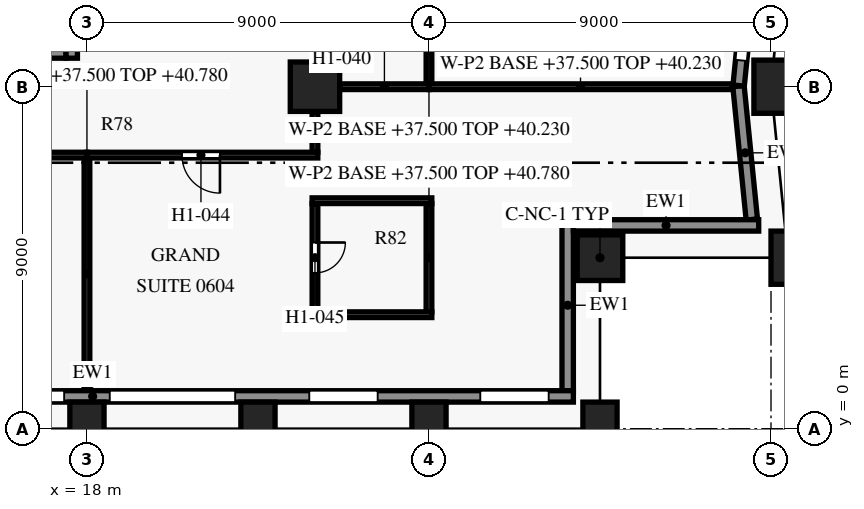
"""IFC4 building model, lengths in metres.
Left out: names, types, materials, properties, quantities, classifications, styles, units other than length and angle.
Written with IfcOpenShell. Run it as: python <this file> out.ifc"""

import sys

from ifc_helpers import new_model, si_unit, direction, frame, frame_2d, origin, origin_2d, place, context, subcontext, project, spatial, rectangle, extrude, element, fill, save


model = new_model("IFC4")
c1 = context("Model", 3, precision=1e-05, world=origin(), true_north=direction((0.0, 1.0)))
c2 = subcontext(c1, "Body", "Model", "MODEL_VIEW")
j1 = project(units=[si_unit("LENGTHUNIT", "METRE"), si_unit("PLANEANGLEUNIT", "RADIAN")], contexts=[c1])
p1 = place(None, origin())
s1 = spatial("IfcSite", under=j1, at=p1, CompositionType="ELEMENT")
p2 = place(p1, origin())
s2 = spatial("IfcBuilding", under=s1, at=p2, CompositionType="ELEMENT")
p3 = place(p2, frame((0.0, 0.0, 37.5)))
s3 = spatial("IfcBuildingStorey", under=s2, at=p3, CompositionType="ELEMENT", Elevation=37.5)
for number, where, z_axis, x_axis in (
    (1, (18.0, 0.0, 0.0), (0.0, 0.0, 1.0), (1.0, 0.0, 0.0)),
    (2, (22.5, 0.0, 0.0), (0.0, 0.0, 1.0), (1.0, 0.0, 0.0)),
    (3, (27.0, 0.0, 0.0), (0.0, 0.0, 1.0), (1.0, 0.0, 0.0)),
    (4, (31.5, 0.0, 0.0), (0.0, 0.0, 1.0), (1.0, 0.0, 0.0)),
    (5, (36.45, 4.5, 0.0), (0.0, 0.0, 1.0), (-0.1, 0.995, 0.0)),
    (6, (36.0, 9.0, 0.0), (0.0, 0.0, 1.0), (0.0, 1.0, 0.0)),
):
    element("IfcColumn", number, at=place(p3, frame(where, z_axis=z_axis, x_axis=x_axis)), inside=s3, PredefinedType="COLUMN", context=c2, shape_type="SweptSolid", body=[
        extrude(rectangle(XDim=0.9, YDim=1.4, at=origin_2d()), origin(), (0.0, 0.0, 1.0), 3.6),
    ])
p4 = place(p3, frame((31.5, 4.5, 0.0), z_axis=(0.0, 0.0, 1.0), x_axis=(1.0, 0.0, 0.0)))
e7 = element("IfcColumn", 7, at=p4, inside=s3, PredefinedType="COLUMN", context=c2, shape_type="SweptSolid", body=[
    extrude(rectangle(XDim=1.2, YDim=1.2, at=origin_2d()), origin(), (0.0, 0.0, 1.0), 3.6),
])
p5 = place(p3, frame((24.0, 9.0, 0.0), z_axis=(0.0, 0.0, 1.0), x_axis=(1.0, 0.0, 0.0)))
e8 = element("IfcColumn", 8, at=p5, inside=s3, PredefinedType="COLUMN", context=c2, shape_type="SweptSolid", body=[
    extrude(rectangle(XDim=1.3, YDim=1.3, at=origin_2d()), origin(), (0.0, 0.0, 1.0), 3.6),
])
p6 = place(p3, frame((30.8, 0.85, 0.0), z_axis=(0.0, 0.0, 1.0), x_axis=(-1.0, 0.0, 0.0)))
e9 = element("IfcWall", 9, at=p6, inside=s3, PredefinedType="SOLIDWALL", context=c2, shape_type="SweptSolid", body=[
    extrude(rectangle(XDim=25.3, YDim=0.3, at=frame_2d((12.65, 0.0))), origin(), (0.0, 0.0, 1.0), 2.95),
])
p7 = place(p6, frame((0.65, 0.0, 0.75)))
e10 = element("IfcOpeningElement", 10, at=p7, cuts=e9, PredefinedType="OPENING", context=c2, shape_type="SweptSolid", body=[
    extrude(rectangle(XDim=1.8, YDim=1.8, at=frame_2d((0.9, 0.9))), frame((0.0, 0.16, 0.0), z_axis=(0.0, -1.0, 0.0), x_axis=(1.0, 0.0, 0.0)), (0.0, 0.0, 1.0), 0.32),
])
p8 = place(p6, frame((5.15, 0.0, 0.75)))
e11 = element("IfcOpeningElement", 11, at=p8, cuts=e9, PredefinedType="OPENING", context=c2, shape_type="SweptSolid", body=[
    extrude(rectangle(XDim=1.8, YDim=1.8, at=frame_2d((0.9, 0.9))), frame((0.0, 0.16, 0.0), z_axis=(0.0, -1.0, 0.0), x_axis=(1.0, 0.0, 0.0)), (0.0, 0.0, 1.0), 0.32),
])
p9 = place(p6, frame((8.9, 0.0, 0.15)))
e12 = element("IfcOpeningElement", 12, at=p9, cuts=e9, PredefinedType="OPENING", context=c2, shape_type="SweptSolid", body=[
    extrude(rectangle(XDim=3.3, YDim=2.4, at=frame_2d((1.65, 1.2))), frame((0.0, 0.16, 0.0), z_axis=(0.0, -1.0, 0.0), x_axis=(1.0, 0.0, 0.0)), (0.0, 0.0, 1.0), 0.32),
])
p10 = place(p6, frame((13.4, 0.0, 0.15)))
e13 = element("IfcOpeningElement", 13, at=p10, cuts=e9, PredefinedType="OPENING", context=c2, shape_type="SweptSolid", body=[
    extrude(rectangle(XDim=3.3, YDim=2.4, at=frame_2d((1.65, 1.2))), frame((0.0, 0.16, 0.0), z_axis=(0.0, -1.0, 0.0), x_axis=(1.0, 0.0, 0.0)), (0.0, 0.0, 1.0), 0.32),
])
p11 = place(p6, frame((18.65, 0.0, 0.75)))
e14 = element("IfcOpeningElement", 14, at=p11, cuts=e9, PredefinedType="OPENING", context=c2, shape_type="SweptSolid", body=[
    extrude(rectangle(XDim=1.8, YDim=1.8, at=frame_2d((0.9, 0.9))), frame((0.0, 0.16, 0.0), z_axis=(0.0, -1.0, 0.0), x_axis=(1.0, 0.0, 0.0)), (0.0, 0.0, 1.0), 0.32),
])
p12 = place(p6, frame((23.15, 0.0, 0.75)))
e15 = element("IfcOpeningElement", 15, at=p12, cuts=e9, PredefinedType="OPENING", context=c2, shape_type="SweptSolid", body=[
    extrude(rectangle(XDim=1.8, YDim=1.8, at=frame_2d((0.9, 0.9))), frame((0.0, 0.16, 0.0), z_axis=(0.0, -1.0, 0.0), x_axis=(1.0, 0.0, 0.0)), (0.0, 0.0, 1.0), 0.32),
])
p13 = place(p3, frame((30.65, 5.5, 0.0), z_axis=(0.0, 0.0, 1.0), x_axis=(0.0, -1.0, 0.0)))
e16 = element("IfcWall", 16, at=p13, inside=s3, PredefinedType="SOLIDWALL", context=c2, shape_type="SweptSolid", body=[
    extrude(rectangle(XDim=4.502, YDim=0.3, at=frame_2d((2.251, 0.0))), origin(), (0.0, 0.0, 1.0), 2.95),
])
p14 = place(p3, frame((35.677, 5.35, 0.0), z_axis=(0.0, 0.0, 1.0), x_axis=(-1.0, 0.0, 0.0)))
e17 = element("IfcWall", 17, at=p14, inside=s3, PredefinedType="SOLIDWALL", context=c2, shape_type="SweptSolid", body=[
    extrude(rectangle(XDim=4.876, YDim=0.3, at=frame_2d((2.438, 0.0))), origin(), (0.0, 0.0, 1.0), 2.95),
])
p15 = place(p3, frame((35.144, 9.015, 0.0), z_axis=(0.0, 0.0, 1.0), x_axis=(0.099462600847, -0.995041301169, 0.0)))
e18 = element("IfcWall", 18, at=p15, inside=s3, PredefinedType="SOLIDWALL", context=c2, shape_type="SweptSolid", body=[
    extrude(rectangle(XDim=3.527, YDim=0.3, at=frame_2d((1.764, 0.0))), origin(), (0.0, 0.0, 1.0), 2.95),
])
p16 = place(p3, frame((36.047, 18.015, 0.0), z_axis=(0.0, 0.0, 1.0), x_axis=(-0.099522457379, -0.995035316196, 0.0)))
e19 = element("IfcWall", 19, at=p16, inside=s3, PredefinedType="SOLIDWALL", context=c2, shape_type="SweptSolid", body=[
    extrude(rectangle(XDim=9.03, YDim=0.3, at=frame_2d((4.515, 0.0))), origin(), (0.0, 0.0, 1.0), 2.95),
])
p17 = place(p16, frame((1.291, 0.0, 0.75)))
e20 = element("IfcOpeningElement", 20, at=p17, cuts=e19, PredefinedType="OPENING", context=c2, shape_type="SweptSolid", body=[
    extrude(rectangle(XDim=1.8, YDim=1.8, at=frame_2d((0.9, 0.9))), frame((0.0, 0.16, 0.0), z_axis=(0.0, -1.0, 0.0), x_axis=(1.0, 0.0, 0.0)), (0.0, 0.0, 1.0), 0.32),
])
p18 = place(p16, frame((5.064, 0.0, 0.15)))
e21 = element("IfcOpeningElement", 21, at=p18, cuts=e19, PredefinedType="OPENING", context=c2, shape_type="SweptSolid", body=[
    extrude(rectangle(XDim=3.3, YDim=2.4, at=frame_2d((1.65, 1.2))), frame((0.0, 0.16, 0.0), z_axis=(0.0, -1.0, 0.0), x_axis=(1.0, 0.0, 0.0)), (0.0, 0.0, 1.0), 0.32),
])
p19 = place(p3, frame((14.15, 9.9, 0.0), z_axis=(0.0, 0.0, 1.0), x_axis=(1.0, 0.0, 0.0)))
e22 = element("IfcWall", 22, at=p19, inside=s3, PredefinedType="SHEAR", context=c2, shape_type="SweptSolid", body=[
    extrude(rectangle(XDim=3.3, YDim=0.3, at=frame_2d((1.65, 0.0))), origin(), (0.0, 0.0, 1.0), 3.3),
])
p20 = place(p3, frame((17.6, 9.75, 0.0), z_axis=(0.0, 0.0, 1.0), x_axis=(0.0, 1.0, 0.0)))
e23 = element("IfcWall", 23, at=p20, inside=s3, PredefinedType="SHEAR", context=c2, shape_type="SweptSolid", body=[
    extrude(rectangle(XDim=8.3, YDim=0.3, at=frame_2d((4.15, 0.0))), origin(), (0.0, 0.0, 1.0), 3.3),
])
p21 = place(p20, frame((0.65, 0.0, 0.0)))
e24 = element("IfcOpeningElement", 24, at=p21, cuts=e23, PredefinedType="OPENING", context=c2, shape_type="SweptSolid", body=[
    extrude(rectangle(XDim=1.2, YDim=2.2, at=frame_2d((0.6, 1.1))), frame((0.0, 0.16, 0.0), z_axis=(0.0, -1.0, 0.0), x_axis=(1.0, 0.0, 0.0)), (0.0, 0.0, 1.0), 0.32),
])
p22 = place(p3, frame((23.925, 3.0, 0.0), z_axis=(0.0, 0.0, 1.0), x_axis=(1.0, 0.0, 0.0)))
e25 = element("IfcWall", 25, at=p22, inside=s3, PredefinedType="PARTITIONING", context=c2, shape_type="SweptSolid", body=[
    extrude(rectangle(XDim=3.15, YDim=0.15, at=frame_2d((1.575, 0.0))), origin(), (0.0, 0.0, 1.0), 2.58),
])
p23 = place(p3, frame((27.0, 3.075, 0.0), z_axis=(0.0, 0.0, 1.0), x_axis=(0.0, 1.0, 0.0)))
e26 = element("IfcWall", 26, at=p23, inside=s3, PredefinedType="PARTITIONING", context=c2, shape_type="SweptSolid", body=[
    extrude(rectangle(XDim=2.85, YDim=0.15, at=frame_2d((1.425, 0.0))), origin(), (0.0, 0.0, 1.0), 3.28),
])
p24 = place(p3, frame((24.0, 5.925, 0.0), z_axis=(0.0, 0.0, 1.0), x_axis=(0.0, -1.0, 0.0)))
e27 = element("IfcWall", 27, at=p24, inside=s3, PredefinedType="PARTITIONING", context=c2, shape_type="SweptSolid", body=[
    extrude(rectangle(XDim=2.85, YDim=0.15, at=frame_2d((1.425, 0.0))), origin(), (0.0, 0.0, 1.0), 2.58),
])
p25 = place(p24, frame((1.025, 0.0, 0.0)))
e28 = element("IfcOpeningElement", 28, at=p25, cuts=e27, PredefinedType="OPENING", context=c2, shape_type="SweptSolid", body=[
    extrude(rectangle(XDim=0.8, YDim=2.1, at=frame_2d((0.4, 1.05))), frame((0.0, 0.085, 0.0), z_axis=(0.0, -1.0, 0.0), x_axis=(1.0, 0.0, 0.0)), (0.0, 0.0, 1.0), 0.17),
])
p26 = place(p3, frame((27.075, 6.0, 0.0), z_axis=(0.0, 0.0, 1.0), x_axis=(-1.0, 0.0, 0.0)))
e29 = element("IfcWall", 29, at=p26, inside=s3, PredefinedType="PARTITIONING", context=c2, shape_type="SweptSolid", body=[
    extrude(rectangle(XDim=3.15, YDim=0.15, at=frame_2d((1.575, 0.0))), origin(), (0.0, 0.0, 1.0), 2.58),
])
p27 = place(p3, frame((18.0, 7.125, 0.0), z_axis=(0.0, 0.0, 1.0), x_axis=(0.0, -1.0, 0.0)))
e30 = element("IfcWall", 30, at=p27, inside=s3, PredefinedType="PARTITIONING", context=c2, shape_type="SweptSolid", body=[
    extrude(rectangle(XDim=6.105, YDim=0.15, at=frame_2d((3.052, 0.0))), origin(), (0.0, 0.0, 1.0), 3.28),
])
p28 = place(p3, frame((18.0, 7.2, 0.0), z_axis=(0.0, 0.0, 1.0), x_axis=(-1.0, 0.0, 0.0)))
e31 = element("IfcWall", 31, at=p28, inside=s3, PredefinedType="PARTITIONING", context=c2, shape_type="SweptSolid", body=[
    extrude(rectangle(XDim=6.075, YDim=0.15, at=frame_2d((3.038, 0.0))), origin(), (0.0, 0.0, 1.0), 2.58),
])
p29 = place(p28, frame((2.5, 0.0, 0.0)))
e32 = element("IfcOpeningElement", 32, at=p29, cuts=e31, PredefinedType="OPENING", context=c2, shape_type="SweptSolid", body=[
    extrude(rectangle(XDim=1.0, YDim=2.1, at=frame_2d((0.5, 1.05))), frame((0.0, 0.085, 0.0), z_axis=(0.0, -1.0, 0.0), x_axis=(1.0, 0.0, 0.0)), (0.0, 0.0, 1.0), 0.17),
])
p30 = place(p3, frame((24.075, 7.2, 0.0), z_axis=(0.0, 0.0, 1.0), x_axis=(-1.0, 0.0, 0.0)))
e33 = element("IfcWall", 33, at=p30, inside=s3, PredefinedType="PARTITIONING", context=c2, shape_type="SweptSolid", body=[
    extrude(rectangle(XDim=6.075, YDim=0.15, at=frame_2d((3.038, 0.0))), origin(), (0.0, 0.0, 1.0), 2.58),
])
p31 = place(p30, frame((2.575, 0.0, 0.0)))
e34 = element("IfcOpeningElement", 34, at=p31, cuts=e33, PredefinedType="OPENING", context=c2, shape_type="SweptSolid", body=[
    extrude(rectangle(XDim=1.0, YDim=2.1, at=frame_2d((0.5, 1.05))), frame((0.0, 0.085, 0.0), z_axis=(0.0, -1.0, 0.0), x_axis=(1.0, 0.0, 0.0)), (0.0, 0.0, 1.0), 0.17),
])
p32 = place(p3, frame((24.0, 8.345, 0.0), z_axis=(0.0, 0.0, 1.0), x_axis=(0.0, -1.0, 0.0)))
e35 = element("IfcWall", 35, at=p32, inside=s3, PredefinedType="PARTITIONING", context=c2, shape_type="SweptSolid", body=[
    extrude(rectangle(XDim=1.07, YDim=0.15, at=frame_2d((0.535, 0.0))), origin(), (0.0, 0.0, 1.0), 2.58),
])
p33 = place(p3, frame((27.0, 9.0, 0.0), z_axis=(0.0, 0.0, 1.0), x_axis=(-1.0, 0.0, 0.0)))
e36 = element("IfcWall", 36, at=p33, inside=s3, PredefinedType="PARTITIONING", context=c2, shape_type="SweptSolid", body=[
    extrude(rectangle(XDim=2.345, YDim=0.15, at=frame_2d((1.172, 0.0))), origin(), (0.0, 0.0, 1.0), 2.73),
])
p34 = place(p3, frame((34.975, 9.0, 0.0), z_axis=(0.0, 0.0, 1.0), x_axis=(-1.0, 0.0, 0.0)))
e37 = element("IfcWall", 37, at=p34, inside=s3, PredefinedType="PARTITIONING", context=c2, shape_type="SweptSolid", body=[
    extrude(rectangle(XDim=7.975, YDim=0.15, at=frame_2d((3.988, 0.0))), origin(), (0.0, 0.0, 1.0), 2.73),
])
p35 = place(p3, frame((27.0, 9.075, 0.0), z_axis=(0.0, 0.0, 1.0), x_axis=(0.0, 1.0, 0.0)))
e38 = element("IfcWall", 38, at=p35, inside=s3, PredefinedType="PARTITIONING", context=c2, shape_type="SweptSolid", body=[
    extrude(rectangle(XDim=1.95, YDim=0.15, at=frame_2d((0.975, 0.0))), origin(), (0.0, 0.0, 1.0), 2.73),
])
p36 = place(p3, frame((24.0, 11.025, 0.0), z_axis=(0.0, 0.0, 1.0), x_axis=(0.0, -1.0, 0.0)))
e39 = element("IfcWall", 39, at=p36, inside=s3, PredefinedType="PARTITIONING", context=c2, shape_type="SweptSolid", body=[
    extrude(rectangle(XDim=1.37, YDim=0.15, at=frame_2d((0.685, 0.0))), origin(), (0.0, 0.0, 1.0), 2.58),
])
p37 = place(p7, origin())
e40 = element("IfcWindow", 40, at=p37, inside=s3, PartitioningType="SINGLE_PANEL", PredefinedType="WINDOW", context=c2, shape_type="SweptSolid", body=[
    extrude(rectangle(XDim=1.8, YDim=1.8, at=frame_2d((0.9, 0.9))), frame((0.0, 0.03, 0.0), z_axis=(0.0, -1.0, 0.0), x_axis=(1.0, 0.0, 0.0)), (0.0, 0.0, 1.0), 0.06),
])
fill(e10, e40)
p38 = place(p8, origin())
e41 = element("IfcWindow", 41, at=p38, inside=s3, PartitioningType="SINGLE_PANEL", PredefinedType="WINDOW", context=c2, shape_type="SweptSolid", body=[
    extrude(rectangle(XDim=1.8, YDim=1.8, at=frame_2d((0.9, 0.9))), frame((0.0, 0.03, 0.0), z_axis=(0.0, -1.0, 0.0), x_axis=(1.0, 0.0, 0.0)), (0.0, 0.0, 1.0), 0.06),
])
fill(e11, e41)
p39 = place(p9, origin())
e42 = element("IfcWindow", 42, at=p39, inside=s3, PartitioningType="SINGLE_PANEL", PredefinedType="WINDOW", context=c2, shape_type="SweptSolid", body=[
    extrude(rectangle(XDim=3.3, YDim=2.4, at=frame_2d((1.65, 1.2))), frame((0.0, 0.03, 0.0), z_axis=(0.0, -1.0, 0.0), x_axis=(1.0, 0.0, 0.0)), (0.0, 0.0, 1.0), 0.06),
])
fill(e12, e42)
p40 = place(p10, origin())
e43 = element("IfcWindow", 43, at=p40, inside=s3, PartitioningType="SINGLE_PANEL", PredefinedType="WINDOW", context=c2, shape_type="SweptSolid", body=[
    extrude(rectangle(XDim=3.3, YDim=2.4, at=frame_2d((1.65, 1.2))), frame((0.0, 0.03, 0.0), z_axis=(0.0, -1.0, 0.0), x_axis=(1.0, 0.0, 0.0)), (0.0, 0.0, 1.0), 0.06),
])
fill(e13, e43)
p41 = place(p18, origin())
e44 = element("IfcWindow", 44, at=p41, inside=s3, PartitioningType="SINGLE_PANEL", PredefinedType="WINDOW", context=c2, shape_type="SweptSolid", body=[
    extrude(rectangle(XDim=3.3, YDim=2.4, at=frame_2d((1.65, 1.2))), frame((0.0, 0.03, 0.0), z_axis=(0.0, -1.0, 0.0), x_axis=(1.0, 0.0, 0.0)), (0.0, 0.0, 1.0), 0.06),
])
fill(e21, e44)
p42 = place(p31, origin())
e45 = element("IfcDoor", 45, at=p42, inside=s3, OperationType="SINGLE_SWING_LEFT", PredefinedType="DOOR", context=c2, shape_type="SweptSolid", body=[
    extrude(rectangle(XDim=1.0, YDim=2.1, at=frame_2d((0.5, 1.05))), frame((0.0, 0.025, 0.0), z_axis=(0.0, -1.0, 0.0), x_axis=(1.0, 0.0, 0.0)), (0.0, 0.0, 1.0), 0.05),
])
fill(e34, e45)
p43 = place(p25, origin())
e46 = element("IfcDoor", 46, at=p43, inside=s3, OperationType="SINGLE_SWING_RIGHT", PredefinedType="DOOR", context=c2, shape_type="SweptSolid", body=[
    extrude(rectangle(XDim=0.8, YDim=2.1, at=frame_2d((0.4, 1.05))), frame((0.0, 0.025, 0.0), z_axis=(0.0, -1.0, 0.0), x_axis=(1.0, 0.0, 0.0)), (0.0, 0.0, 1.0), 0.05),
])
fill(e28, e46)
save(model, sys.argv[1])
